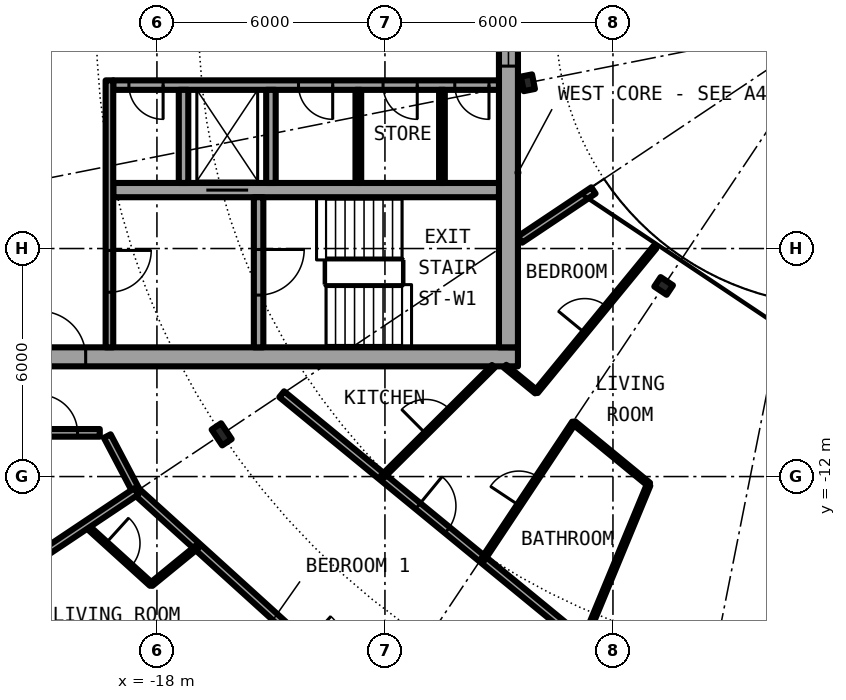
"""IFC4 building model, lengths in metres.
Left out: names, types, materials, properties, quantities, classifications, styles, units other than length and angle.
Written with IfcOpenShell. Run it as: python <this file> out.ifc"""

import sys

from ifc_helpers import new_model, si_unit, direction, frame, frame_2d, origin, origin_2d, place, context, subcontext, project, spatial, rectangle, i_section, extrude, element, fill, save


model = new_model("IFC4")
c1 = context("Model", 3, precision=1e-05, world=origin(), true_north=direction((0.0, 1.0)))
c2 = subcontext(c1, "Body", "Model", "MODEL_VIEW")
j1 = project(units=[si_unit("LENGTHUNIT", "METRE"), si_unit("PLANEANGLEUNIT", "RADIAN")], contexts=[c1])
p1 = place(None, origin())
s1 = spatial("IfcSite", under=j1, at=p1, CompositionType="ELEMENT")
p2 = place(p1, origin())
s2 = spatial("IfcBuilding", under=s1, at=p2, CompositionType="ELEMENT")
p3 = place(p2, frame((0.0, 0.0, 145.2)))
s3 = spatial("IfcBuildingStorey", under=s2, at=p3, CompositionType="ELEMENT", Elevation=145.2)
p4 = place(p3, frame((-16.297, -10.889, 0.0), z_axis=(0.0, 0.0, 1.0), x_axis=(-0.831469612303, -0.55557023302, 0.0)))
e1 = element("IfcColumn", 1, at=p4, inside=s3, PredefinedType="COLUMN", context=c2, shape_type="SweptSolid", body=[
    extrude(i_section(OverallWidth=0.3, OverallDepth=0.5, WebThickness=0.014, FlangeThickness=0.028, FilletRadius=0.027, at=origin_2d()), origin(), (0.0, 0.0, 1.0), 3.05),
])
for number, where, z_axis, x_axis in (
    (2, (-8.239, -1.639, 0.0), (0.0, 0.0, 1.0), (-0.981, -0.195, 0.0)),
    (3, (-4.667, -6.984, 0.0), (0.0, 0.0, 1.0), (-0.556, -0.831, 0.0)),
):
    element("IfcColumn", number, at=place(p3, frame(where, z_axis=z_axis, x_axis=x_axis)), inside=s3, PredefinedType="COLUMN", context=c2, shape_type="SweptSolid", body=[
        extrude(i_section(OverallWidth=0.3, OverallDepth=0.39, WebThickness=0.011, FlangeThickness=0.019, FilletRadius=0.027, at=origin_2d()), origin(), (0.0, 0.0, 1.0), 3.05),
    ])
p5 = place(p3, frame((-22.699, -15.167, 0.0), z_axis=(0.0, 0.0, 1.0), x_axis=(0.634382322723, -0.773019449054, 0.0)))
e4 = element("IfcWall", 4, at=p5, inside=s3, PredefinedType="SOLIDWALL", context=c2, shape_type="SweptSolid", body=[
    extrude(rectangle(XDim=5.352, YDim=0.25, at=frame_2d((2.676, 0.0))), origin(), (0.0, 0.0, 1.0), 2.7),
])
p6 = place(p5, frame((0.441, 0.0, 0.3)))
e5 = element("IfcOpeningElement", 5, at=p6, cuts=e4, PredefinedType="OPENING", context=c2, shape_type="SweptSolid", body=[
    extrude(rectangle(XDim=1.8, YDim=2.1, at=frame_2d((0.9, 1.05))), frame((0.0, 0.135, 0.0), z_axis=(0.0, -1.0, 0.0), x_axis=(1.0, 0.0, 0.0)), (0.0, 0.0, 1.0), 0.27),
])
p7 = place(p5, frame((3.51, 0.0, 0.0)))
e6 = element("IfcOpeningElement", 6, at=p7, cuts=e4, PredefinedType="OPENING", context=c2, shape_type="SweptSolid", body=[
    extrude(rectangle(XDim=1.0, YDim=2.2, at=frame_2d((0.5, 1.1))), frame((0.0, 0.135, 0.0), z_axis=(0.0, -1.0, 0.0), x_axis=(1.0, 0.0, 0.0)), (0.0, 0.0, 1.0), 0.27),
])
p8 = place(p3, frame((-22.1, -8.85, 0.0), z_axis=(0.0, 0.0, 1.0), x_axis=(1.0, 0.0, 0.0)))
e7 = element("IfcWall", 7, at=p8, inside=s3, PredefinedType="SHEAR", context=c2, shape_type="SweptSolid", body=[
    extrude(rectangle(XDim=13.6, YDim=0.5, at=frame_2d((6.8, 0.0))), origin(), (0.0, 0.0, 1.0), 3.05),
])
p9 = place(p8, frame((1.025, 0.0, 0.0)))
e8 = element("IfcOpeningElement", 8, at=p9, cuts=e7, PredefinedType="OPENING", context=c2, shape_type="SweptSolid", body=[
    extrude(rectangle(XDim=1.2, YDim=2.3, at=frame_2d((0.6, 1.15))), frame((0.0, 0.26, 0.0), z_axis=(0.0, -1.0, 0.0), x_axis=(1.0, 0.0, 0.0)), (0.0, 0.0, 1.0), 0.52),
])
p10 = place(p3, frame((-8.75, 8.6, 0.0), z_axis=(0.0, 0.0, 1.0), x_axis=(0.0, -1.0, 0.0)))
e9 = element("IfcWall", 9, at=p10, inside=s3, PredefinedType="SHEAR", context=c2, shape_type="SweptSolid", body=[
    extrude(rectangle(XDim=17.2, YDim=0.5, at=frame_2d((8.6, 0.0))), origin(), (0.0, 0.0, 1.0), 3.05),
])
p11 = place(p10, frame((7.4, 0.0, 0.1)))
e10 = element("IfcOpeningElement", 10, at=p11, cuts=e9, PredefinedType="OPENING", context=c2, shape_type="SweptSolid", body=[
    extrude(rectangle(XDim=2.4, YDim=2.2, at=frame_2d((1.2, 1.1))), frame((0.0, 0.26, 0.0), z_axis=(0.0, -1.0, 0.0), x_axis=(1.0, 0.0, 0.0)), (0.0, 0.0, 1.0), 0.52),
])
p12 = place(p3, frame((-9.0, -1.7, 0.0), z_axis=(0.0, 0.0, 1.0), x_axis=(-1.0, 0.0, 0.0)))
e11 = element("IfcWall", 11, at=p12, inside=s3, PredefinedType="SHEAR", context=c2, shape_type="SweptSolid", body=[
    extrude(rectangle(XDim=10.15, YDim=0.25, at=frame_2d((5.075, 0.0))), origin(), (0.0, 0.0, 1.0), 3.05),
])
p13 = place(p12, frame((0.262, 0.0, 0.0)))
e12 = element("IfcOpeningElement", 12, at=p13, cuts=e11, PredefinedType="OPENING", context=c2, shape_type="SweptSolid", body=[
    extrude(rectangle(XDim=0.9, YDim=2.3, at=frame_2d((0.45, 1.15))), frame((0.0, 0.135, 0.0), z_axis=(0.0, -1.0, 0.0), x_axis=(1.0, 0.0, 0.0)), (0.0, 0.0, 1.0), 0.27),
])
p14 = place(p12, frame((2.15, 0.0, 0.0)))
e13 = element("IfcOpeningElement", 13, at=p14, cuts=e11, PredefinedType="OPENING", context=c2, shape_type="SweptSolid", body=[
    extrude(rectangle(XDim=0.9, YDim=2.3, at=frame_2d((0.45, 1.15))), frame((0.0, 0.135, 0.0), z_axis=(0.0, -1.0, 0.0), x_axis=(1.0, 0.0, 0.0)), (0.0, 0.0, 1.0), 0.27),
])
p15 = place(p12, frame((4.375, 0.0, 0.0)))
e14 = element("IfcOpeningElement", 14, at=p15, cuts=e11, PredefinedType="OPENING", context=c2, shape_type="SweptSolid", body=[
    extrude(rectangle(XDim=0.9, YDim=2.3, at=frame_2d((0.45, 1.15))), frame((0.0, 0.135, 0.0), z_axis=(0.0, -1.0, 0.0), x_axis=(1.0, 0.0, 0.0)), (0.0, 0.0, 1.0), 0.27),
])
p16 = place(p12, frame((8.837, 0.0, 0.0)))
e15 = element("IfcOpeningElement", 15, at=p16, cuts=e11, PredefinedType="OPENING", context=c2, shape_type="SweptSolid", body=[
    extrude(rectangle(XDim=0.9, YDim=2.3, at=frame_2d((0.45, 1.15))), frame((0.0, 0.135, 0.0), z_axis=(0.0, -1.0, 0.0), x_axis=(1.0, 0.0, 0.0)), (0.0, 0.0, 1.0), 0.27),
])
p17 = place(p3, frame((-9.0, -4.462, 0.0), z_axis=(0.0, 0.0, 1.0), x_axis=(-1.0, 0.0, 0.0)))
e16 = element("IfcWall", 16, at=p17, inside=s3, PredefinedType="SHEAR", context=c2, shape_type="SweptSolid", body=[
    extrude(rectangle(XDim=10.15, YDim=0.375, at=frame_2d((5.075, 0.0))), origin(), (0.0, 0.0, 1.0), 3.05),
])
p18 = place(p17, frame((6.6, 0.0, 0.0)))
e17 = element("IfcOpeningElement", 17, at=p18, cuts=e16, PredefinedType="OPENING", context=c2, shape_type="SweptSolid", body=[
    extrude(rectangle(XDim=1.1, YDim=2.3, at=frame_2d((0.55, 1.15))), frame((0.0, 0.198, 0.0), z_axis=(0.0, -1.0, 0.0), x_axis=(1.0, 0.0, 0.0)), (0.0, 0.0, 1.0), 0.395),
])
p19 = place(p3, frame((-15.325, -4.65, 0.0), z_axis=(0.0, 0.0, 1.0), x_axis=(0.0, -1.0, 0.0)))
e18 = element("IfcWall", 18, at=p19, inside=s3, PredefinedType="SHEAR", context=c2, shape_type="SweptSolid", body=[
    extrude(rectangle(XDim=3.95, YDim=0.25, at=frame_2d((1.975, 0.0))), origin(), (0.0, 0.0, 1.0), 3.05),
])
p20 = place(p19, frame((1.375, 0.0, 0.0)))
e19 = element("IfcOpeningElement", 19, at=p20, cuts=e18, PredefinedType="OPENING", context=c2, shape_type="SweptSolid", body=[
    extrude(rectangle(XDim=1.2, YDim=2.3, at=frame_2d((0.6, 1.15))), frame((0.0, 0.135, 0.0), z_axis=(0.0, -1.0, 0.0), x_axis=(1.0, 0.0, 0.0)), (0.0, 0.0, 1.0), 0.27),
])
for number, where, z_axis, x_axis in (
    (20, (-15.0, -1.825, 0.0), (0.0, 0.0, 1.0), (0.0, -1.0, 0.0)),
    (21, (-17.3, -1.825, 0.0), (0.0, 0.0, 1.0), (0.0, -1.0, 0.0)),
):
    element("IfcWall", number, at=place(p3, frame(where, z_axis=z_axis, x_axis=x_axis)), inside=s3, PredefinedType="SOLIDWALL", context=c2, shape_type="SweptSolid", body=[
        extrude(rectangle(XDim=2.45, YDim=0.25, at=frame_2d((1.225, 0.0))), origin(), (0.0, 0.0, 1.0), 2.7),
    ])
p21 = place(p3, frame((-19.25, -1.575, 0.0), z_axis=(0.0, 0.0, 1.0), x_axis=(0.0, -1.0, 0.0)))
e22 = element("IfcWall", 22, at=p21, inside=s3, PredefinedType="SOLIDWALL", context=c2, shape_type="SweptSolid", body=[
    extrude(rectangle(XDim=7.025, YDim=0.2, at=frame_2d((3.513, 0.0))), origin(), (0.0, 0.0, 1.0), 2.7),
])
p22 = place(p21, frame((4.475, 0.0, 0.0)))
e23 = element("IfcOpeningElement", 23, at=p22, cuts=e22, PredefinedType="OPENING", context=c2, shape_type="SweptSolid", body=[
    extrude(rectangle(XDim=1.1, YDim=2.3, at=frame_2d((0.55, 1.15))), frame((0.0, 0.11, 0.0), z_axis=(0.0, -1.0, 0.0), x_axis=(1.0, 0.0, 0.0)), (0.0, 0.0, 1.0), 0.22),
])
for number, where, z_axis, x_axis in (
    (24, (-10.5, -1.825, 0.0), (0.0, 0.0, 1.0), (0.0, -1.0, 0.0)),
    (25, (-12.7, -1.825, 0.0), (0.0, 0.0, 1.0), (0.0, -1.0, 0.0)),
):
    element("IfcWall", number, at=place(p3, frame(where, z_axis=z_axis, x_axis=x_axis)), inside=s3, PredefinedType="PARTITIONING", context=c2, shape_type="SweptSolid", body=[
        extrude(rectangle(XDim=2.45, YDim=0.15, at=frame_2d((1.225, 0.0))), origin(), (0.0, 0.0, 1.0), 2.7),
    ])
p23 = place(p3, frame((-19.872, -13.278, 0.0), z_axis=(0.0, 0.0, 1.0), x_axis=(0.740990220108, -0.671515817911, 0.0)))
e26 = element("IfcWall", 26, at=p23, inside=s3, PredefinedType="PARTITIONING", context=c2, shape_type="SweptSolid", body=[
    extrude(rectangle(XDim=2.323, YDim=0.1, at=frame_2d((1.161, 0.0))), origin(), (0.0, 0.0, 1.0), 2.7),
])
p24 = place(p23, frame((0.711, 0.0, 0.0)))
e27 = element("IfcOpeningElement", 27, at=p24, cuts=e26, PredefinedType="OPENING", context=c2, shape_type="SweptSolid", body=[
    extrude(rectangle(XDim=0.9, YDim=2.3, at=frame_2d((0.45, 1.15))), frame((0.0, 0.06, 0.0), z_axis=(0.0, -1.0, 0.0), x_axis=(1.0, 0.0, 0.0)), (0.0, 0.0, 1.0), 0.12),
])
p25 = place(p3, frame((-19.307, -10.935, 0.0), z_axis=(0.0, 0.0, 1.0), x_axis=(0.465605550524, -0.884992356646, 0.0)))
e28 = element("IfcWall", 28, at=p25, inside=s3, PredefinedType="PARTITIONING", context=c2, shape_type="SweptSolid", body=[
    extrude(rectangle(XDim=1.643, YDim=0.2, at=frame_2d((0.821, 0.0))), origin(), (0.0, 0.0, 1.0), 2.7),
])
p26 = place(p3, frame((-18.542, -12.389, 0.0), z_axis=(0.0, 0.0, 1.0), x_axis=(0.740947367223, -0.671563101283, 0.0)))
e29 = element("IfcWall", 29, at=p26, inside=s3, PredefinedType="PARTITIONING", context=c2, shape_type="SweptSolid", body=[
    extrude(rectangle(XDim=10.837, YDim=0.2, at=frame_2d((5.419, 0.0))), origin(), (0.0, 0.0, 1.0), 2.7),
])
p27 = place(p26, frame((6.002, 0.0, 0.0)))
e30 = element("IfcOpeningElement", 30, at=p27, cuts=e29, PredefinedType="OPENING", context=c2, shape_type="SweptSolid", body=[
    extrude(rectangle(XDim=1.0, YDim=2.3, at=frame_2d((0.5, 1.15))), frame((0.0, 0.11, 0.0), z_axis=(0.0, -1.0, 0.0), x_axis=(1.0, 0.0, 0.0)), (0.0, 0.0, 1.0), 0.22),
])
p28 = place(p3, frame((-14.717, -9.834, 0.0), z_axis=(0.0, 0.0, 1.0), x_axis=(0.773034536097, -0.634363938131, 0.0)))
e31 = element("IfcWall", 31, at=p28, inside=s3, PredefinedType="PARTITIONING", context=c2, shape_type="SweptSolid", body=[
    extrude(rectangle(XDim=10.277, YDim=0.2, at=frame_2d((5.138, 0.0))), origin(), (0.0, 0.0, 1.0), 2.7),
])
p29 = place(p28, frame((4.638, 0.0, 0.0)))
e32 = element("IfcOpeningElement", 32, at=p29, cuts=e31, PredefinedType="OPENING", context=c2, shape_type="SweptSolid", body=[
    extrude(rectangle(XDim=1.0, YDim=2.3, at=frame_2d((0.5, 1.15))), frame((0.0, 0.11, 0.0), z_axis=(0.0, -1.0, 0.0), x_axis=(1.0, 0.0, 0.0)), (0.0, 0.0, 1.0), 0.22),
])
p30 = place(p3, frame((-8.839, -9.098, 0.0), z_axis=(0.0, 0.0, 1.0), x_axis=(0.7731800648, -0.634186555673, 0.0)))
e33 = element("IfcWall", 33, at=p30, inside=s3, PredefinedType="PARTITIONING", context=c2, shape_type="SweptSolid", body=[
    extrude(rectangle(XDim=1.064, YDim=0.1, at=frame_2d((0.532, 0.0))), origin(), (0.0, 0.0, 1.0), 2.7),
])
p31 = place(p3, frame((-7.031, -10.582, 0.0), z_axis=(0.0, 0.0, 1.0), x_axis=(0.772943675046, -0.634474645046, 0.0)))
e34 = element("IfcWall", 34, at=p31, inside=s3, PredefinedType="PARTITIONING", context=c2, shape_type="SweptSolid", body=[
    extrude(rectangle(XDim=2.557, YDim=0.1, at=frame_2d((1.278, 0.0))), origin(), (0.0, 0.0, 1.0), 2.7),
])
p32 = place(p3, frame((-21.675, -10.85, 0.0), z_axis=(0.0, 0.0, 1.0), x_axis=(1.0, 0.0, 0.0)))
e35 = element("IfcWall", 35, at=p32, inside=s3, PredefinedType="PARTITIONING", context=c2, shape_type="SweptSolid", body=[
    extrude(rectangle(XDim=2.171, YDim=0.2, at=frame_2d((1.085, 0.0))), origin(), (0.0, 0.0, 1.0), 2.7),
])
p33 = place(p32, frame((0.585, 0.0, 0.0)))
e36 = element("IfcOpeningElement", 36, at=p33, cuts=e35, PredefinedType="OPENING", context=c2, shape_type="SweptSolid", body=[
    extrude(rectangle(XDim=1.0, YDim=2.3, at=frame_2d((0.5, 1.15))), frame((0.0, 0.11, 0.0), z_axis=(0.0, -1.0, 0.0), x_axis=(1.0, 0.0, 0.0)), (0.0, 0.0, 1.0), 0.22),
])
p34 = place(p3, frame((-6.513, -4.472, 0.0), z_axis=(0.0, 0.0, 1.0), x_axis=(-0.83133816625, -0.555766905579, 0.0)))
e37 = element("IfcWall", 37, at=p34, inside=s3, PredefinedType="PARTITIONING", context=c2, shape_type="SweptSolid", body=[
    extrude(rectangle(XDim=2.323, YDim=0.2, at=frame_2d((1.162, 0.0))), origin(), (0.0, 0.0, 1.0), 2.7),
])
p35 = place(p3, frame((-22.595, -15.098, 0.0), z_axis=(0.0, 0.0, 1.0), x_axis=(0.831387096605, 0.55569370664, 0.0)))
e38 = element("IfcWall", 38, at=p35, inside=s3, PredefinedType="PARTITIONING", context=c2, shape_type="SweptSolid", body=[
    extrude(rectangle(XDim=4.875, YDim=0.2, at=frame_2d((2.438, 0.0))), origin(), (0.0, 0.0, 1.0), 2.7),
])
p36 = place(p3, frame((-18.151, -14.838, 0.0), z_axis=(0.0, 0.0, 1.0), x_axis=(0.774283039722, 0.632839453889, 0.0)))
e39 = element("IfcWall", 39, at=p36, inside=s3, PredefinedType="PARTITIONING", context=c2, shape_type="SweptSolid", body=[
    extrude(rectangle(XDim=1.569, YDim=0.1, at=frame_2d((0.785, 0.0))), origin(), (0.0, 0.0, 1.0), 2.7),
])
p37 = place(p3, frame((-12.069, -12.007, 0.0), z_axis=(0.0, 0.0, 1.0), x_axis=(0.708822693149, 0.705386695138, 0.0)))
e40 = element("IfcWall", 40, at=p37, inside=s3, PredefinedType="PARTITIONING", context=c2, shape_type="SweptSolid", body=[
    extrude(rectangle(XDim=4.121, YDim=0.1, at=frame_2d((2.061, 0.0))), origin(), (0.0, 0.0, 1.0), 2.7),
])
p38 = place(p37, frame((1.611, 0.0, 0.0)))
e41 = element("IfcOpeningElement", 41, at=p38, cuts=e40, PredefinedType="OPENING", context=c2, shape_type="SweptSolid", body=[
    extrude(rectangle(XDim=0.9, YDim=2.3, at=frame_2d((0.45, 1.15))), frame((0.0, 0.06, 0.0), z_axis=(0.0, -1.0, 0.0), x_axis=(1.0, 0.0, 0.0)), (0.0, 0.0, 1.0), 0.12),
])
p39 = place(p3, frame((-9.421, -14.18, 0.0), z_axis=(0.0, 0.0, 1.0), x_axis=(0.553303732327, 0.832979579457, 0.0)))
e42 = element("IfcWall", 42, at=p39, inside=s3, PredefinedType="PARTITIONING", context=c2, shape_type="SweptSolid", body=[
    extrude(rectangle(XDim=4.319, YDim=0.1, at=frame_2d((2.16, 0.0))), origin(), (0.0, 0.0, 1.0), 2.7),
])
p40 = place(p39, frame((1.71, 0.0, 0.0)))
e43 = element("IfcOpeningElement", 43, at=p40, cuts=e42, PredefinedType="OPENING", context=c2, shape_type="SweptSolid", body=[
    extrude(rectangle(XDim=0.9, YDim=2.3, at=frame_2d((0.45, 1.15))), frame((0.0, 0.06, 0.0), z_axis=(0.0, -1.0, 0.0), x_axis=(1.0, 0.0, 0.0)), (0.0, 0.0, 1.0), 0.12),
])
p41 = place(p3, frame((-8.019, -9.771, 0.0), z_axis=(0.0, 0.0, 1.0), x_axis=(0.634401778971, 0.773003481776, 0.0)))
e44 = element("IfcWall", 44, at=p41, inside=s3, PredefinedType="PARTITIONING", context=c2, shape_type="SweptSolid", body=[
    extrude(rectangle(XDim=4.92, YDim=0.1, at=frame_2d((2.46, 0.0))), origin(), (0.0, 0.0, 1.0), 2.7),
])
p42 = place(p41, frame((2.01, 0.0, 0.0)))
e45 = element("IfcOpeningElement", 45, at=p42, cuts=e44, PredefinedType="OPENING", context=c2, shape_type="SweptSolid", body=[
    extrude(rectangle(XDim=0.9, YDim=2.3, at=frame_2d((0.45, 1.15))), frame((0.0, 0.06, 0.0), z_axis=(0.0, -1.0, 0.0), x_axis=(1.0, 0.0, 0.0)), (0.0, 0.0, 1.0), 0.12),
])
p43 = place(p3, frame((-5.063, -12.223, 0.0), z_axis=(0.0, 0.0, 1.0), x_axis=(-0.382498794932, -0.923955990226, 0.0)))
e46 = element("IfcWall", 46, at=p43, inside=s3, PredefinedType="PARTITIONING", context=c2, shape_type="SweptSolid", body=[
    extrude(rectangle(XDim=4.449, YDim=0.1, at=frame_2d((2.225, 0.0))), origin(), (0.0, 0.0, 1.0), 2.7),
])
p44 = place(p18, origin())
e47 = element("IfcDoor", 47, at=p44, inside=s3, OperationType="DOUBLE_DOOR_SLIDING", PredefinedType="DOOR", context=c2, shape_type="SweptSolid", body=[
    extrude(rectangle(XDim=1.1, YDim=2.3, at=frame_2d((0.55, 1.15))), frame((0.0, 0.025, 0.0), z_axis=(0.0, -1.0, 0.0), x_axis=(1.0, 0.0, 0.0)), (0.0, 0.0, 1.0), 0.05),
])
fill(e17, e47)
p45 = place(p13, origin())
e48 = element("IfcDoor", 48, at=p45, inside=s3, OperationType="SINGLE_SWING_RIGHT", PredefinedType="DOOR", context=c2, shape_type="SweptSolid", body=[
    extrude(rectangle(XDim=0.9, YDim=2.3, at=frame_2d((0.45, 1.15))), frame((0.0, 0.025, 0.0), z_axis=(0.0, -1.0, 0.0), x_axis=(1.0, 0.0, 0.0)), (0.0, 0.0, 1.0), 0.05),
])
fill(e12, e48)
p46 = place(p14, origin())
e49 = element("IfcDoor", 49, at=p46, inside=s3, OperationType="SINGLE_SWING_RIGHT", PredefinedType="DOOR", context=c2, shape_type="SweptSolid", body=[
    extrude(rectangle(XDim=0.9, YDim=2.3, at=frame_2d((0.45, 1.15))), frame((0.0, 0.025, 0.0), z_axis=(0.0, -1.0, 0.0), x_axis=(1.0, 0.0, 0.0)), (0.0, 0.0, 1.0), 0.05),
])
fill(e13, e49)
p47 = place(p15, origin())
e50 = element("IfcDoor", 50, at=p47, inside=s3, OperationType="SINGLE_SWING_RIGHT", PredefinedType="DOOR", context=c2, shape_type="SweptSolid", body=[
    extrude(rectangle(XDim=0.9, YDim=2.3, at=frame_2d((0.45, 1.15))), frame((0.0, 0.025, 0.0), z_axis=(0.0, -1.0, 0.0), x_axis=(1.0, 0.0, 0.0)), (0.0, 0.0, 1.0), 0.05),
])
fill(e14, e50)
p48 = place(p16, origin())
e51 = element("IfcDoor", 51, at=p48, inside=s3, OperationType="SINGLE_SWING_LEFT", PredefinedType="DOOR", context=c2, shape_type="SweptSolid", body=[
    extrude(rectangle(XDim=0.9, YDim=2.3, at=frame_2d((0.45, 1.15))), frame((0.0, 0.025, 0.0), z_axis=(0.0, -1.0, 0.0), x_axis=(1.0, 0.0, 0.0)), (0.0, 0.0, 1.0), 0.05),
])
fill(e15, e51)
p49 = place(p20, origin())
e52 = element("IfcDoor", 52, at=p49, inside=s3, OperationType="SINGLE_SWING_LEFT", PredefinedType="DOOR", context=c2, shape_type="SweptSolid", body=[
    extrude(rectangle(XDim=1.2, YDim=2.3, at=frame_2d((0.6, 1.15))), frame((0.0, 0.025, 0.0), z_axis=(0.0, -1.0, 0.0), x_axis=(1.0, 0.0, 0.0)), (0.0, 0.0, 1.0), 0.05),
])
fill(e19, e52)
p50 = place(p22, origin())
e53 = element("IfcDoor", 53, at=p50, inside=s3, OperationType="SINGLE_SWING_LEFT", PredefinedType="DOOR", context=c2, shape_type="SweptSolid", body=[
    extrude(rectangle(XDim=1.1, YDim=2.3, at=frame_2d((0.55, 1.15))), frame((0.0, 0.025, 0.0), z_axis=(0.0, -1.0, 0.0), x_axis=(1.0, 0.0, 0.0)), (0.0, 0.0, 1.0), 0.05),
])
fill(e23, e53)
p51 = place(p9, origin())
e54 = element("IfcDoor", 54, at=p51, inside=s3, OperationType="SINGLE_SWING_RIGHT", PredefinedType="DOOR", context=c2, shape_type="SweptSolid", body=[
    extrude(rectangle(XDim=1.2, YDim=2.3, at=frame_2d((0.6, 1.15))), frame((0.0, 0.025, 0.0), z_axis=(0.0, -1.0, 0.0), x_axis=(1.0, 0.0, 0.0)), (0.0, 0.0, 1.0), 0.05),
])
fill(e8, e54)
p52 = place(p11, origin())
e55 = element("IfcWindow", 55, at=p52, inside=s3, PartitioningType="SINGLE_PANEL", PredefinedType="WINDOW", context=c2, shape_type="SweptSolid", body=[
    extrude(rectangle(XDim=2.4, YDim=2.2, at=frame_2d((1.2, 1.1))), frame((0.0, 0.03, 0.0), z_axis=(0.0, -1.0, 0.0), x_axis=(1.0, 0.0, 0.0)), (0.0, 0.0, 1.0), 0.06),
])
fill(e10, e55)
p53 = place(p24, origin())
e56 = element("IfcDoor", 56, at=p53, inside=s3, OperationType="SINGLE_SWING_RIGHT", PredefinedType="DOOR", context=c2, shape_type="SweptSolid", body=[
    extrude(rectangle(XDim=0.9, YDim=2.3, at=frame_2d((0.45, 1.15))), frame((0.0, 0.025, 0.0), z_axis=(0.0, -1.0, 0.0), x_axis=(1.0, 0.0, 0.0)), (0.0, 0.0, 1.0), 0.05),
])
fill(e27, e56)
p54 = place(p29, origin())
e57 = element("IfcDoor", 57, at=p54, inside=s3, OperationType="SINGLE_SWING_LEFT", PredefinedType="DOOR", context=c2, shape_type="SweptSolid", body=[
    extrude(rectangle(XDim=1.0, YDim=2.3, at=frame_2d((0.5, 1.15))), frame((0.0, 0.025, 0.0), z_axis=(0.0, -1.0, 0.0), x_axis=(1.0, 0.0, 0.0)), (0.0, 0.0, 1.0), 0.05),
])
fill(e32, e57)
p55 = place(p40, origin())
e58 = element("IfcDoor", 58, at=p55, inside=s3, OperationType="SINGLE_SWING_RIGHT", PredefinedType="DOOR", context=c2, shape_type="SweptSolid", body=[
    extrude(rectangle(XDim=0.9, YDim=2.3, at=frame_2d((0.45, 1.15))), frame((0.0, 0.025, 0.0), z_axis=(0.0, -1.0, 0.0), x_axis=(1.0, 0.0, 0.0)), (0.0, 0.0, 1.0), 0.05),
])
fill(e43, e58)
p56 = place(p38, origin())
e59 = element("IfcDoor", 59, at=p56, inside=s3, OperationType="SINGLE_SWING_RIGHT", PredefinedType="DOOR", context=c2, shape_type="SweptSolid", body=[
    extrude(rectangle(XDim=0.9, YDim=2.3, at=frame_2d((0.45, 1.15))), frame((0.0, 0.025, 0.0), z_axis=(0.0, -1.0, 0.0), x_axis=(1.0, 0.0, 0.0)), (0.0, 0.0, 1.0), 0.05),
])
fill(e41, e59)
p57 = place(p42, origin())
e60 = element("IfcDoor", 60, at=p57, inside=s3, OperationType="SINGLE_SWING_LEFT", PredefinedType="DOOR", context=c2, shape_type="SweptSolid", body=[
    extrude(rectangle(XDim=0.9, YDim=2.3, at=frame_2d((0.45, 1.15))), frame((0.0, 0.025, 0.0), z_axis=(0.0, -1.0, 0.0), x_axis=(1.0, 0.0, 0.0)), (0.0, 0.0, 1.0), 0.05),
])
fill(e45, e60)
p58 = place(p33, origin())
e61 = element("IfcDoor", 61, at=p58, inside=s3, OperationType="SINGLE_SWING_LEFT", PredefinedType="DOOR", context=c2, shape_type="SweptSolid", body=[
    extrude(rectangle(XDim=1.0, YDim=2.3, at=frame_2d((0.5, 1.15))), frame((0.0, 0.025, 0.0), z_axis=(0.0, -1.0, 0.0), x_axis=(1.0, 0.0, 0.0)), (0.0, 0.0, 1.0), 0.05),
])
fill(e36, e61)
save(model, sys.argv[1])
